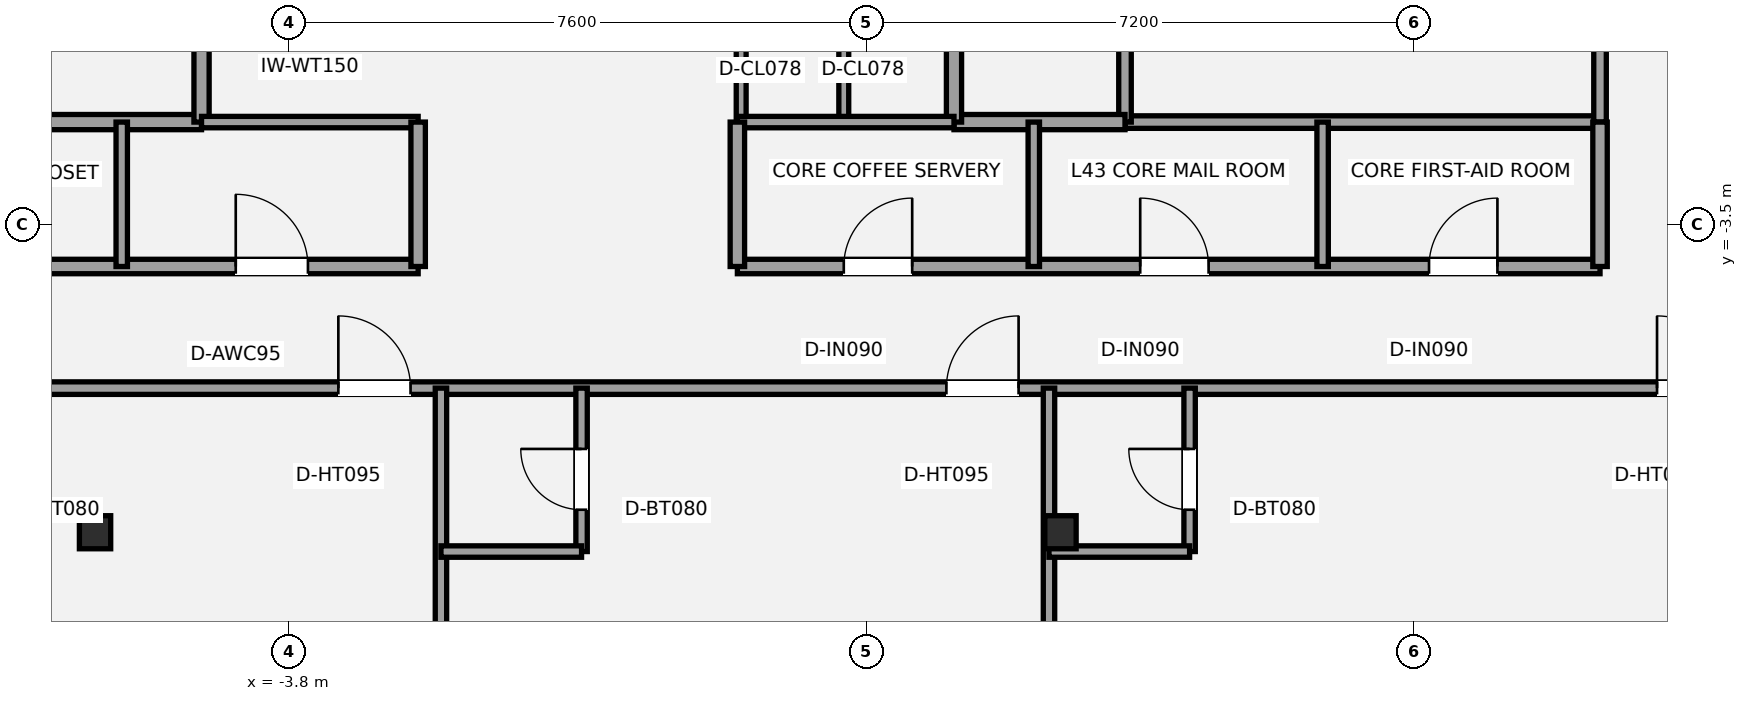
"""IFC4 building model, lengths in metres.
Left out: names, types, materials, properties, quantities, classifications, styles, units other than length and angle.
Written with IfcOpenShell. Run it as: python <this file> out.ifc"""

import sys

from ifc_helpers import new_model, si_unit, direction, frame, frame_2d, origin, origin_2d, place, context, subcontext, project, spatial, rectangle, i_section, extrude, element, fill, save


model = new_model("IFC4")
c1 = context("Model", 3, precision=1e-05, world=origin(), true_north=direction((0.0, 1.0)))
c2 = subcontext(c1, "Body", "Model", "MODEL_VIEW")
j1 = project(units=[si_unit("LENGTHUNIT", "METRE"), si_unit("PLANEANGLEUNIT", "RADIAN")], contexts=[c1])
p1 = place(None, origin())
s1 = spatial("IfcSite", under=j1, at=p1, CompositionType="ELEMENT")
p2 = place(p1, origin())
s2 = spatial("IfcBuilding", under=s1, at=p2, CompositionType="ELEMENT")
p3 = place(p2, frame((0.0, 0.0, 159.8)))
s3 = spatial("IfcBuildingStorey", under=s2, at=p3, CompositionType="ELEMENT", Elevation=159.8)
for number, where, z_axis, x_axis in (
    (1, (-6.351, -7.546, 0.0), (0.0, 0.0, 1.0), (1.0, 0.0, 0.0)),
    (2, (6.351, -7.546, 0.0), (0.0, 0.0, 1.0), (1.0, 0.0, 0.0)),
):
    element("IfcColumn", number, at=place(p3, frame(where, z_axis=z_axis, x_axis=x_axis)), inside=s3, PredefinedType="COLUMN", context=c2, shape_type="SweptSolid", body=[
        extrude(i_section(OverallWidth=0.412, OverallDepth=0.435, WebThickness=0.036, FlangeThickness=0.057, at=origin_2d()), origin(), (0.0, 0.0, 1.0), 3.2),
    ])
p4 = place(p3, frame((-7.2, -2.15, 0.0), z_axis=(0.0, 0.0, 1.0), x_axis=(1.0, 0.0, 0.0)))
e3 = element("IfcWall", 3, at=p4, inside=s3, PredefinedType="SOLIDWALL", context=c2, shape_type="SweptSolid", body=[
    extrude(rectangle(XDim=2.25, YDim=0.2, at=frame_2d((1.125, 0.0))), origin(), (0.0, 0.0, 1.0), 3.02),
])
p5 = place(p3, frame((-4.95, -2.15, 0.0), z_axis=(0.0, 0.0, 1.0), x_axis=(0.0, 1.0, 0.0)))
e4 = element("IfcWall", 4, at=p5, inside=s3, PredefinedType="SOLIDWALL", context=c2, shape_type="SweptSolid", body=[
    extrude(rectangle(XDim=3.4, YDim=0.2, at=frame_2d((1.7, 0.0))), origin(), (0.0, 0.0, 1.0), 2.473),
])
p6 = place(p5, frame((0.95, 0.0, 0.0)))
e5 = element("IfcOpeningElement", 5, at=p6, cuts=e4, PredefinedType="OPENING", context=c2, shape_type="SweptSolid", body=[
    extrude(rectangle(XDim=0.75, YDim=2.1, at=frame_2d((0.375, 1.05))), frame((0.0, 0.11, 0.0), z_axis=(0.0, -1.0, 0.0), x_axis=(1.0, 0.0, 0.0)), (0.0, 0.0, 1.0), 0.22),
])
p7 = place(p3, frame((7.2, -2.15, 0.0), z_axis=(0.0, 0.0, 1.0), x_axis=(1.0, 0.0, 0.0)))
e6 = element("IfcWall", 6, at=p7, inside=s3, PredefinedType="PARTITIONING", context=c2, shape_type="SweptSolid", body=[
    extrude(rectangle(XDim=6.25, YDim=0.165, at=frame_2d((3.125, 0.0))), origin(), (0.0, 0.0, 1.0), 3.02),
])
p8 = place(p3, frame((7.2, -2.15, 0.0), z_axis=(0.0, 0.0, 1.0), x_axis=(0.0, 1.0, 0.0)))
e7 = element("IfcWall", 7, at=p8, inside=s3, PredefinedType="PARTITIONING", context=c2, shape_type="SweptSolid", body=[
    extrude(rectangle(XDim=3.4, YDim=0.165, at=frame_2d((1.7, 0.0))), origin(), (0.0, 0.0, 1.0), 2.473),
])
p9 = place(p3, frame((13.45, -2.15, 0.0), z_axis=(0.0, 0.0, 1.0), x_axis=(0.0, 1.0, 0.0)))
e8 = element("IfcWall", 8, at=p9, inside=s3, PredefinedType="PARTITIONING", context=c2, shape_type="SweptSolid", body=[
    extrude(rectangle(XDim=3.4, YDim=0.165, at=frame_2d((1.7, 0.0))), origin(), (0.0, 0.0, 1.0), 3.02),
])
p10 = place(p9, frame((1.15, 0.0, 0.0)))
e9 = element("IfcOpeningElement", 9, at=p10, cuts=e8, PredefinedType="OPENING", context=c2, shape_type="SweptSolid", body=[
    extrude(rectangle(XDim=1.05, YDim=2.15, at=frame_2d((0.525, 1.075))), frame((0.0, 0.093, 0.0), z_axis=(0.0, -1.0, 0.0), x_axis=(1.0, 0.0, 0.0)), (0.0, 0.0, 1.0), 0.185),
])
p11 = place(p3, frame((4.95, -2.15, 0.0), z_axis=(0.0, 0.0, 1.0), x_axis=(1.0, 0.0, 0.0)))
e10 = element("IfcWall", 10, at=p11, inside=s3, PredefinedType="SOLIDWALL", context=c2, shape_type="SweptSolid", body=[
    extrude(rectangle(XDim=2.25, YDim=0.2, at=frame_2d((1.125, 0.0))), origin(), (0.0, 0.0, 1.0), 3.02),
])
p12 = place(p3, frame((4.95, -2.15, 0.0), z_axis=(0.0, 0.0, 1.0), x_axis=(0.0, 1.0, 0.0)))
e11 = element("IfcWall", 11, at=p12, inside=s3, PredefinedType="SOLIDWALL", context=c2, shape_type="SweptSolid", body=[
    extrude(rectangle(XDim=3.4, YDim=0.2, at=frame_2d((1.7, 0.0))), origin(), (0.0, 0.0, 1.0), 2.473),
])
p13 = place(p12, frame((0.95, 0.0, 0.0)))
e12 = element("IfcOpeningElement", 12, at=p13, cuts=e11, PredefinedType="OPENING", context=c2, shape_type="SweptSolid", body=[
    extrude(rectangle(XDim=0.75, YDim=2.1, at=frame_2d((0.375, 1.05))), frame((0.0, 0.11, 0.0), z_axis=(0.0, -1.0, 0.0), x_axis=(1.0, 0.0, 0.0)), (0.0, 0.0, 1.0), 0.22),
])
p14 = place(p3, frame((2.15, -2.15, 0.0), z_axis=(0.0, 0.0, 1.0), x_axis=(0.0, 1.0, 0.0)))
e13 = element("IfcWall", 13, at=p14, inside=s3, PredefinedType="PARTITIONING", context=c2, shape_type="SweptSolid", body=[
    extrude(rectangle(XDim=1.8, YDim=0.13, at=frame_2d((0.9, 0.0))), origin(), (0.0, 0.0, 1.0), 3.02),
])
p15 = place(p3, frame((3.5, -2.15, 0.0), z_axis=(0.0, 0.0, 1.0), x_axis=(0.0, 1.0, 0.0)))
e14 = element("IfcWall", 14, at=p15, inside=s3, PredefinedType="PARTITIONING", context=c2, shape_type="SweptSolid", body=[
    extrude(rectangle(XDim=1.8, YDim=0.13, at=frame_2d((0.9, 0.0))), origin(), (0.0, 0.0, 1.0), 2.473),
])
p16 = place(p3, frame((-13.45, -4.05, 0.0), z_axis=(0.0, 0.0, 1.0), x_axis=(1.0, 0.0, 0.0)))
e15 = element("IfcWall", 15, at=p16, inside=s3, PredefinedType="PLUMBINGWALL", context=c2, shape_type="SweptSolid", body=[
    extrude(rectangle(XDim=11.35, YDim=0.19, at=frame_2d((5.675, 0.0))), origin(), (0.0, 0.0, 1.0), 2.555),
])
p17 = place(p16, frame((1.25, 0.0, 0.0)))
e16 = element("IfcOpeningElement", 16, at=p17, cuts=e15, PredefinedType="OPENING", context=c2, shape_type="SweptSolid", body=[
    extrude(rectangle(XDim=0.85, YDim=2.1, at=frame_2d((0.425, 1.05))), frame((0.0, 0.105, 0.0), z_axis=(0.0, -1.0, 0.0), x_axis=(1.0, 0.0, 0.0)), (0.0, 0.0, 1.0), 0.21),
])
p18 = place(p16, frame((5.1, 0.0, 0.0)))
e17 = element("IfcOpeningElement", 17, at=p18, cuts=e15, PredefinedType="OPENING", context=c2, shape_type="SweptSolid", body=[
    extrude(rectangle(XDim=0.85, YDim=2.1, at=frame_2d((0.425, 1.05))), frame((0.0, 0.105, 0.0), z_axis=(0.0, -1.0, 0.0), x_axis=(1.0, 0.0, 0.0)), (0.0, 0.0, 1.0), 0.21),
])
p19 = place(p16, frame((8.95, 0.0, 0.0)))
e18 = element("IfcOpeningElement", 18, at=p19, cuts=e15, PredefinedType="OPENING", context=c2, shape_type="SweptSolid", body=[
    extrude(rectangle(XDim=0.95, YDim=2.15, at=frame_2d((0.475, 1.075))), frame((0.0, 0.105, 0.0), z_axis=(0.0, -1.0, 0.0), x_axis=(1.0, 0.0, 0.0)), (0.0, 0.0, 1.0), 0.21),
])
p20 = place(p3, frame((-4.95, -2.15, 0.0), z_axis=(0.0, 0.0, 1.0), x_axis=(1.0, 0.0, 0.0)))
e19 = element("IfcWall", 19, at=p20, inside=s3, PredefinedType="PLUMBINGWALL", context=c2, shape_type="SweptSolid", body=[
    extrude(rectangle(XDim=2.85, YDim=0.15, at=frame_2d((1.425, 0.0))), origin(), (0.0, 0.0, 1.0), 2.473),
])
p21 = place(p3, frame((-2.1, -4.05, 0.0), z_axis=(0.0, 0.0, 1.0), x_axis=(0.0, 1.0, 0.0)))
e20 = element("IfcWall", 20, at=p21, inside=s3, PredefinedType="PLUMBINGWALL", context=c2, shape_type="SweptSolid", body=[
    extrude(rectangle(XDim=1.9, YDim=0.19, at=frame_2d((0.95, 0.0))), origin(), (0.0, 0.0, 1.0), 2.473),
])
p22 = place(p3, frame((-6.0, -4.05, 0.0), z_axis=(0.0, 0.0, 1.0), x_axis=(0.0, 1.0, 0.0)))
e21 = element("IfcWall", 21, at=p22, inside=s3, PredefinedType="PLUMBINGWALL", context=c2, shape_type="SweptSolid", body=[
    extrude(rectangle(XDim=1.9, YDim=0.15, at=frame_2d((0.95, 0.0))), origin(), (0.0, 0.0, 1.0), 2.473),
])
p23 = place(p3, frame((2.1, -4.05, 0.0), z_axis=(0.0, 0.0, 1.0), x_axis=(1.0, 0.0, 0.0)))
e22 = element("IfcWall", 22, at=p23, inside=s3, PredefinedType="PLUMBINGWALL", context=c2, shape_type="SweptSolid", body=[
    extrude(rectangle(XDim=11.35, YDim=0.19, at=frame_2d((5.675, 0.0))), origin(), (0.0, 0.0, 1.0), 2.473),
])
p24 = place(p23, frame((1.4, 0.0, 0.0)))
e23 = element("IfcOpeningElement", 23, at=p24, cuts=e22, PredefinedType="OPENING", context=c2, shape_type="SweptSolid", body=[
    extrude(rectangle(XDim=0.9, YDim=2.1, at=frame_2d((0.45, 1.05))), frame((0.0, 0.105, 0.0), z_axis=(0.0, -1.0, 0.0), x_axis=(1.0, 0.0, 0.0)), (0.0, 0.0, 1.0), 0.21),
])
p25 = place(p23, frame((5.3, 0.0, 0.0)))
e24 = element("IfcOpeningElement", 24, at=p25, cuts=e22, PredefinedType="OPENING", context=c2, shape_type="SweptSolid", body=[
    extrude(rectangle(XDim=0.9, YDim=2.1, at=frame_2d((0.45, 1.05))), frame((0.0, 0.105, 0.0), z_axis=(0.0, -1.0, 0.0), x_axis=(1.0, 0.0, 0.0)), (0.0, 0.0, 1.0), 0.21),
])
p26 = place(p23, frame((9.1, 0.0, 0.0)))
e25 = element("IfcOpeningElement", 25, at=p26, cuts=e22, PredefinedType="OPENING", context=c2, shape_type="SweptSolid", body=[
    extrude(rectangle(XDim=0.9, YDim=2.1, at=frame_2d((0.45, 1.05))), frame((0.0, 0.105, 0.0), z_axis=(0.0, -1.0, 0.0), x_axis=(1.0, 0.0, 0.0)), (0.0, 0.0, 1.0), 0.21),
])
p27 = place(p3, frame((2.1, -2.15, 0.0), z_axis=(0.0, 0.0, 1.0), x_axis=(1.0, 0.0, 0.0)))
e26 = element("IfcWall", 26, at=p27, inside=s3, PredefinedType="PLUMBINGWALL", context=c2, shape_type="SweptSolid", body=[
    extrude(rectangle(XDim=2.85, YDim=0.15, at=frame_2d((1.425, 0.0))), origin(), (0.0, 0.0, 1.0), 3.02),
])
for number, where, z_axis, x_axis in (
    (27, (2.1, -4.05, 0.0), (0.0, 0.0, 1.0), (0.0, 1.0, 0.0)),
    (28, (13.45, -4.05, 0.0), (0.0, 0.0, 1.0), (0.0, 1.0, 0.0)),
):
    element("IfcWall", number, at=place(p3, frame(where, z_axis=z_axis, x_axis=x_axis)), inside=s3, PredefinedType="PLUMBINGWALL", context=c2, shape_type="SweptSolid", body=[
        extrude(rectangle(XDim=1.9, YDim=0.19, at=frame_2d((0.95, 0.0))), origin(), (0.0, 0.0, 1.0), 2.473),
    ])
p28 = place(p3, frame((6.0, -4.05, 0.0), z_axis=(0.0, 0.0, 1.0), x_axis=(0.0, 1.0, 0.0)))
e29 = element("IfcWall", 29, at=p28, inside=s3, PredefinedType="PLUMBINGWALL", context=c2, shape_type="SweptSolid", body=[
    extrude(rectangle(XDim=1.9, YDim=0.15, at=frame_2d((0.95, 0.0))), origin(), (0.0, 0.0, 1.0), 2.473),
])
p29 = place(p3, frame((9.8, -4.05, 0.0), z_axis=(0.0, 0.0, 1.0), x_axis=(0.0, 1.0, 0.0)))
e30 = element("IfcWall", 30, at=p29, inside=s3, PredefinedType="PLUMBINGWALL", context=c2, shape_type="SweptSolid", body=[
    extrude(rectangle(XDim=1.9, YDim=0.15, at=frame_2d((0.95, 0.0))), origin(), (0.0, 0.0, 1.0), 3.02),
])
p30 = place(p3, frame((-15.95, -5.65, 0.0), z_axis=(0.0, 0.0, 1.0), x_axis=(1.0, 0.0, 0.0)))
e31 = element("IfcWall", 31, at=p30, inside=s3, PredefinedType="PARTITIONING", context=c2, shape_type="SweptSolid", body=[
    extrude(rectangle(XDim=31.5, YDim=0.165, at=frame_2d((15.75, 0.0))), origin(), (0.0, 0.0, 1.0), 2.398),
])
p31 = place(p30, frame((4.8, 0.0, 0.0)))
e32 = element("IfcOpeningElement", 32, at=p31, cuts=e31, PredefinedType="OPENING", context=c2, shape_type="SweptSolid", body=[
    extrude(rectangle(XDim=0.95, YDim=2.15, at=frame_2d((0.475, 1.075))), frame((0.0, 0.093, 0.0), z_axis=(0.0, -1.0, 0.0), x_axis=(1.0, 0.0, 0.0)), (0.0, 0.0, 1.0), 0.185),
])
p32 = place(p30, frame((12.8, 0.0, 0.0)))
e33 = element("IfcOpeningElement", 33, at=p32, cuts=e31, PredefinedType="OPENING", context=c2, shape_type="SweptSolid", body=[
    extrude(rectangle(XDim=0.95, YDim=2.15, at=frame_2d((0.475, 1.075))), frame((0.0, 0.093, 0.0), z_axis=(0.0, -1.0, 0.0), x_axis=(1.0, 0.0, 0.0)), (0.0, 0.0, 1.0), 0.185),
])
p33 = place(p30, frame((20.8, 0.0, 0.0)))
e34 = element("IfcOpeningElement", 34, at=p33, cuts=e31, PredefinedType="OPENING", context=c2, shape_type="SweptSolid", body=[
    extrude(rectangle(XDim=0.95, YDim=2.15, at=frame_2d((0.475, 1.075))), frame((0.0, 0.093, 0.0), z_axis=(0.0, -1.0, 0.0), x_axis=(1.0, 0.0, 0.0)), (0.0, 0.0, 1.0), 0.185),
])
p34 = place(p30, frame((30.15, 0.0, 0.0)))
e35 = element("IfcOpeningElement", 35, at=p34, cuts=e31, PredefinedType="OPENING", context=c2, shape_type="SweptSolid", body=[
    extrude(rectangle(XDim=0.95, YDim=2.15, at=frame_2d((0.475, 1.075))), frame((0.0, 0.093, 0.0), z_axis=(0.0, -1.0, 0.0), x_axis=(1.0, 0.0, 0.0)), (0.0, 0.0, 1.0), 0.185),
])
p35 = place(p3, frame((-1.8, -16.34, 0.0), z_axis=(0.0, 0.0, 1.0), x_axis=(0.0, 1.0, 0.0)))
e36 = element("IfcWall", 36, at=p35, inside=s3, PredefinedType="PLUMBINGWALL", context=c2, shape_type="SweptSolid", body=[
    extrude(rectangle(XDim=10.69, YDim=0.15, at=frame_2d((5.345, 0.0))), origin(), (0.0, 0.0, 1.0), 2.473),
])
p36 = place(p3, frame((6.2, -15.853, 0.0), z_axis=(0.0, 0.0, 1.0), x_axis=(0.0, 1.0, 0.0)))
e37 = element("IfcWall", 37, at=p36, inside=s3, PredefinedType="PLUMBINGWALL", context=c2, shape_type="SweptSolid", body=[
    extrude(rectangle(XDim=10.203, YDim=0.15, at=frame_2d((5.102, 0.0))), origin(), (0.0, 0.0, 1.0), 2.473),
])
p37 = place(p3, frame((0.05, -7.8, 0.0), z_axis=(0.0, 0.0, 1.0), x_axis=(0.0, 1.0, 0.0)))
e38 = element("IfcWall", 38, at=p37, inside=s3, PredefinedType="PLUMBINGWALL", context=c2, shape_type="SweptSolid", body=[
    extrude(rectangle(XDim=2.15, YDim=0.15, at=frame_2d((1.075, 0.0))), origin(), (0.0, 0.0, 1.0), 2.473),
])
p38 = place(p37, frame((0.55, 0.0, 0.0)))
e39 = element("IfcOpeningElement", 39, at=p38, cuts=e38, PredefinedType="OPENING", context=c2, shape_type="SweptSolid", body=[
    extrude(rectangle(XDim=0.8, YDim=2.1, at=frame_2d((0.4, 1.05))), frame((0.0, 0.085, 0.0), z_axis=(0.0, -1.0, 0.0), x_axis=(1.0, 0.0, 0.0)), (0.0, 0.0, 1.0), 0.17),
])
p39 = place(p3, frame((-1.8, -7.8, 0.0), z_axis=(0.0, 0.0, 1.0), x_axis=(1.0, 0.0, 0.0)))
e40 = element("IfcWall", 40, at=p39, inside=s3, PredefinedType="PLUMBINGWALL", context=c2, shape_type="SweptSolid", body=[
    extrude(rectangle(XDim=1.85, YDim=0.15, at=frame_2d((0.925, 0.0))), origin(), (0.0, 0.0, 1.0), 3.02),
])
p40 = place(p3, frame((8.05, -7.8, 0.0), z_axis=(0.0, 0.0, 1.0), x_axis=(0.0, 1.0, 0.0)))
e41 = element("IfcWall", 41, at=p40, inside=s3, PredefinedType="PLUMBINGWALL", context=c2, shape_type="SweptSolid", body=[
    extrude(rectangle(XDim=2.15, YDim=0.15, at=frame_2d((1.075, 0.0))), origin(), (0.0, 0.0, 1.0), 2.473),
])
p41 = place(p40, frame((0.55, 0.0, 0.0)))
e42 = element("IfcOpeningElement", 42, at=p41, cuts=e41, PredefinedType="OPENING", context=c2, shape_type="SweptSolid", body=[
    extrude(rectangle(XDim=0.8, YDim=2.1, at=frame_2d((0.4, 1.05))), frame((0.0, 0.085, 0.0), z_axis=(0.0, -1.0, 0.0), x_axis=(1.0, 0.0, 0.0)), (0.0, 0.0, 1.0), 0.17),
])
p42 = place(p3, frame((6.2, -7.8, 0.0), z_axis=(0.0, 0.0, 1.0), x_axis=(1.0, 0.0, 0.0)))
e43 = element("IfcWall", 43, at=p42, inside=s3, PredefinedType="PLUMBINGWALL", context=c2, shape_type="SweptSolid", body=[
    extrude(rectangle(XDim=1.85, YDim=0.15, at=frame_2d((0.925, 0.0))), origin(), (0.0, 0.0, 1.0), 2.473),
])
p43 = place(p19, origin())
e44 = element("IfcDoor", 44, at=p43, inside=s3, OperationType="SINGLE_SWING_LEFT", PredefinedType="DOOR", context=c2, shape_type="SweptSolid", body=[
    extrude(rectangle(XDim=0.95, YDim=2.15, at=frame_2d((0.475, 1.075))), frame((0.0, 0.025, 0.0), z_axis=(0.0, -1.0, 0.0), x_axis=(1.0, 0.0, 0.0)), (0.0, 0.0, 1.0), 0.05),
])
fill(e18, e44)
p44 = place(p24, origin())
e45 = element("IfcDoor", 45, at=p44, inside=s3, OperationType="SINGLE_SWING_RIGHT", PredefinedType="DOOR", context=c2, shape_type="SweptSolid", body=[
    extrude(rectangle(XDim=0.9, YDim=2.1, at=frame_2d((0.45, 1.05))), frame((0.0, 0.025, 0.0), z_axis=(0.0, -1.0, 0.0), x_axis=(1.0, 0.0, 0.0)), (0.0, 0.0, 1.0), 0.05),
])
fill(e23, e45)
p45 = place(p25, origin())
e46 = element("IfcDoor", 46, at=p45, inside=s3, OperationType="SINGLE_SWING_LEFT", PredefinedType="DOOR", context=c2, shape_type="SweptSolid", body=[
    extrude(rectangle(XDim=0.9, YDim=2.1, at=frame_2d((0.45, 1.05))), frame((0.0, 0.025, 0.0), z_axis=(0.0, -1.0, 0.0), x_axis=(1.0, 0.0, 0.0)), (0.0, 0.0, 1.0), 0.05),
])
fill(e24, e46)
p46 = place(p26, origin())
e47 = element("IfcDoor", 47, at=p46, inside=s3, OperationType="SINGLE_SWING_RIGHT", PredefinedType="DOOR", context=c2, shape_type="SweptSolid", body=[
    extrude(rectangle(XDim=0.9, YDim=2.1, at=frame_2d((0.45, 1.05))), frame((0.0, 0.025, 0.0), z_axis=(0.0, -1.0, 0.0), x_axis=(1.0, 0.0, 0.0)), (0.0, 0.0, 1.0), 0.05),
])
fill(e25, e47)
p47 = place(p32, origin())
e48 = element("IfcDoor", 48, at=p47, inside=s3, OperationType="SINGLE_SWING_LEFT", PredefinedType="DOOR", context=c2, shape_type="SweptSolid", body=[
    extrude(rectangle(XDim=0.95, YDim=2.15, at=frame_2d((0.475, 1.075))), frame((0.0, 0.025, 0.0), z_axis=(0.0, -1.0, 0.0), x_axis=(1.0, 0.0, 0.0)), (0.0, 0.0, 1.0), 0.05),
])
fill(e33, e48)
p48 = place(p33, origin())
e49 = element("IfcDoor", 49, at=p48, inside=s3, OperationType="SINGLE_SWING_RIGHT", PredefinedType="DOOR", context=c2, shape_type="SweptSolid", body=[
    extrude(rectangle(XDim=0.95, YDim=2.15, at=frame_2d((0.475, 1.075))), frame((0.0, 0.025, 0.0), z_axis=(0.0, -1.0, 0.0), x_axis=(1.0, 0.0, 0.0)), (0.0, 0.0, 1.0), 0.05),
])
fill(e34, e49)
p49 = place(p38, origin())
e50 = element("IfcDoor", 50, at=p49, inside=s3, OperationType="SINGLE_SWING_RIGHT", PredefinedType="DOOR", context=c2, shape_type="SweptSolid", body=[
    extrude(rectangle(XDim=0.8, YDim=2.1, at=frame_2d((0.4, 1.05))), frame((0.0, 0.025, 0.0), z_axis=(0.0, -1.0, 0.0), x_axis=(1.0, 0.0, 0.0)), (0.0, 0.0, 1.0), 0.05),
])
fill(e39, e50)
p50 = place(p34, origin())
e51 = element("IfcDoor", 51, at=p50, inside=s3, OperationType="SINGLE_SWING_LEFT", PredefinedType="DOOR", context=c2, shape_type="SweptSolid", body=[
    extrude(rectangle(XDim=0.95, YDim=2.15, at=frame_2d((0.475, 1.075))), frame((0.0, 0.025, 0.0), z_axis=(0.0, -1.0, 0.0), x_axis=(1.0, 0.0, 0.0)), (0.0, 0.0, 1.0), 0.05),
])
fill(e35, e51)
p51 = place(p41, origin())
e52 = element("IfcDoor", 52, at=p51, inside=s3, OperationType="SINGLE_SWING_RIGHT", PredefinedType="DOOR", context=c2, shape_type="SweptSolid", body=[
    extrude(rectangle(XDim=0.8, YDim=2.1, at=frame_2d((0.4, 1.05))), frame((0.0, 0.025, 0.0), z_axis=(0.0, -1.0, 0.0), x_axis=(1.0, 0.0, 0.0)), (0.0, 0.0, 1.0), 0.05),
])
fill(e42, e52)
save(model, sys.argv[1])
